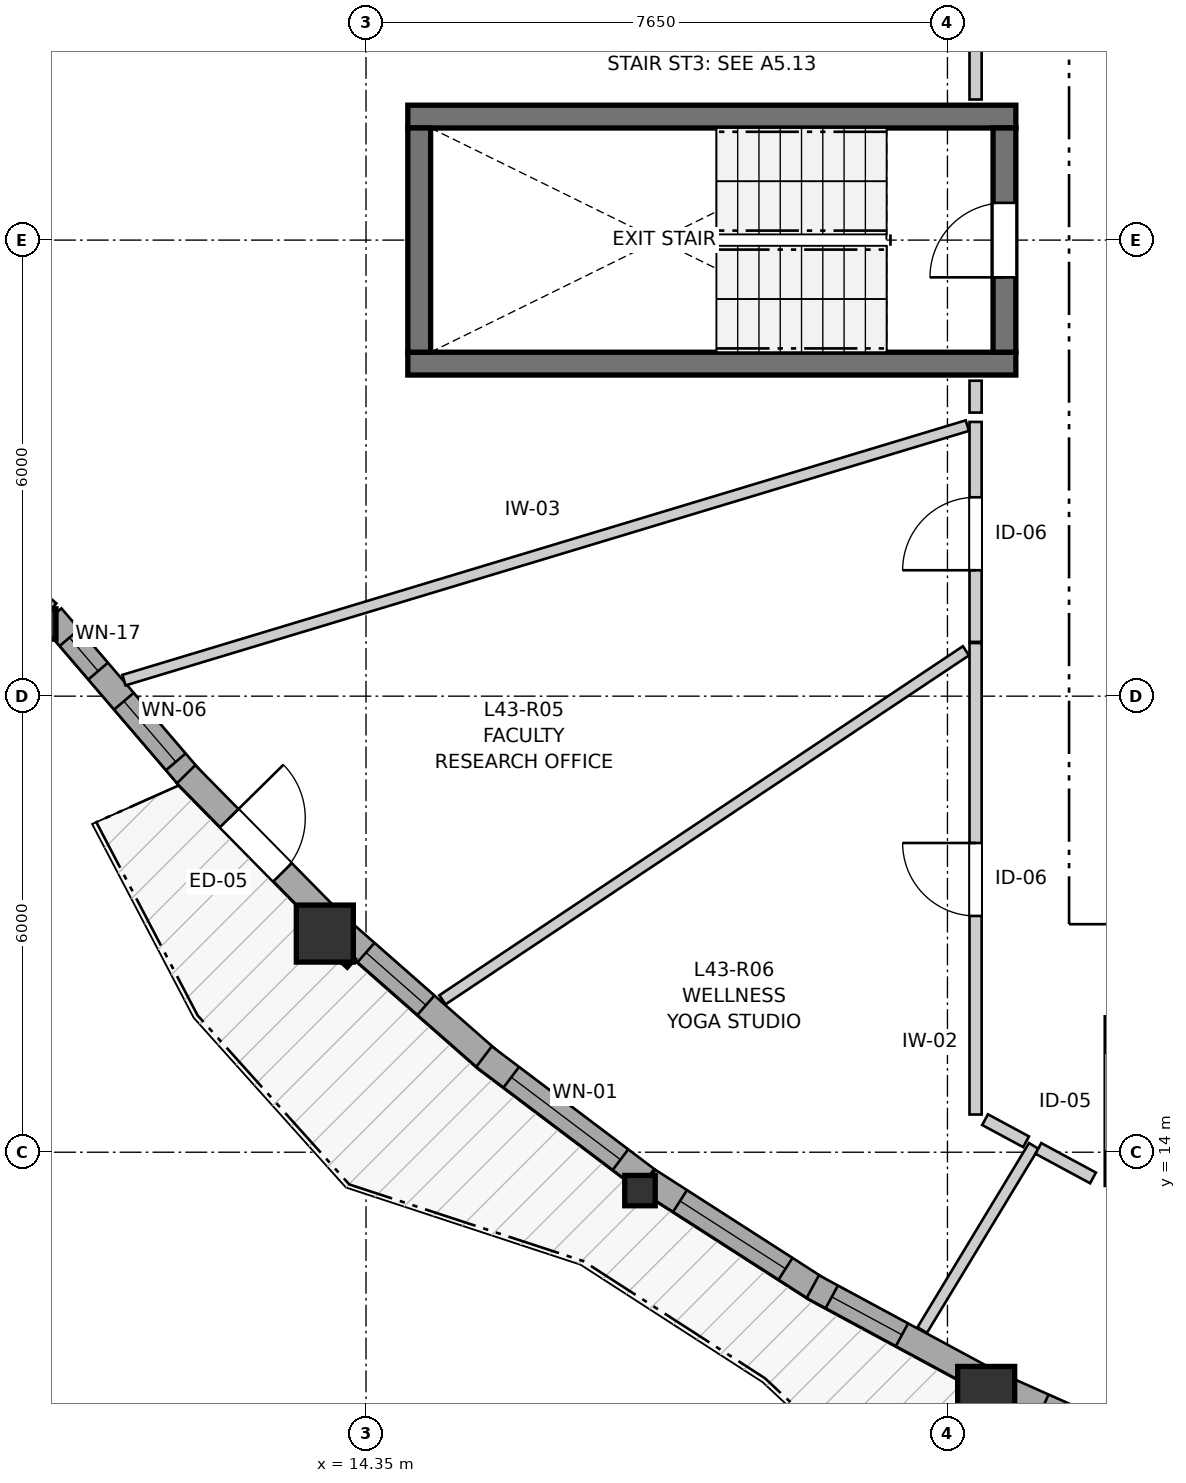
"""IFC4 building model, lengths in metres.
Left out: names, types, materials, properties, quantities, classifications, styles, units other than length and angle.
Written with IfcOpenShell. Run it as: python <this file> out.ifc"""

import sys

from ifc_helpers import new_model, si_unit, direction, frame, frame_2d, origin, origin_2d, place, context, subcontext, project, spatial, rectangle, i_section, extrude, source, transform, mapped, element, fill, save


model = new_model("IFC4")
c1 = context("Model", 3, precision=1e-05, world=origin(), true_north=direction((0.0, 1.0)))
c2 = subcontext(c1, "Body", "Model", "MODEL_VIEW")
j1 = project(units=[si_unit("LENGTHUNIT", "METRE"), si_unit("PLANEANGLEUNIT", "RADIAN")], contexts=[c1])
p1 = place(None, origin())
s1 = spatial("IfcSite", under=j1, at=p1, CompositionType="ELEMENT")
p2 = place(p1, origin())
s2 = spatial("IfcBuilding", under=s1, at=p2, CompositionType="ELEMENT")
p3 = place(p2, frame((0.0, 0.0, 145.8)))
s3 = spatial("IfcBuildingStorey", under=s2, at=p3, CompositionType="ELEMENT", Elevation=145.8)
for number, where, z_axis, x_axis in (
    (1, (14.9, 24.375, 0.0), (0.0, 0.0, 1.0), (1.0, 0.0, 0.0)),
    (2, (22.9, 27.625, 0.0), (0.0, 0.0, 1.0), (-1.0, 0.0, 0.0)),
):
    element("IfcWall", number, at=place(p3, frame(where, z_axis=z_axis, x_axis=x_axis)), inside=s3, PredefinedType="SHEAR", context=c2, shape_type="SweptSolid", body=[
        extrude(rectangle(XDim=8.0, YDim=0.3, at=frame_2d((4.0, 0.0))), origin(), (0.0, 0.0, 1.0), 2.95),
    ])
p4 = place(p3, frame((15.05, 27.475, 0.0), z_axis=(0.0, 0.0, 1.0), x_axis=(0.0, -1.0, 0.0)))
e3 = element("IfcWall", 3, at=p4, inside=s3, PredefinedType="SHEAR", context=c2, shape_type="SweptSolid", body=[
    extrude(rectangle(XDim=2.95, YDim=0.3, at=frame_2d((1.475, 0.0))), origin(), (0.0, 0.0, 1.0), 2.95),
])
p5 = place(p3, frame((22.75, 24.525, 0.0), z_axis=(0.0, 0.0, 1.0), x_axis=(0.0, 1.0, 0.0)))
e4 = element("IfcWall", 4, at=p5, inside=s3, PredefinedType="SHEAR", context=c2, shape_type="SweptSolid", body=[
    extrude(rectangle(XDim=2.95, YDim=0.3, at=frame_2d((1.475, 0.0))), origin(), (0.0, 0.0, 1.0), 2.95),
])
p6 = place(p5, frame((0.985, 0.0, 0.0)))
e5 = element("IfcOpeningElement", 5, at=p6, cuts=e4, PredefinedType="OPENING", context=c2, shape_type="SweptSolid", body=[
    extrude(rectangle(XDim=0.98, YDim=2.15, at=frame_2d((0.49, 1.075))), frame((0.0, 0.16, 0.0), z_axis=(0.0, -1.0, 0.0), x_axis=(1.0, 0.0, 0.0)), (0.0, 0.0, 1.0), 0.32),
])
m1 = source(origin(), c2, "Body", "SweptSolid", [
    extrude(i_section(OverallWidth=0.401, OverallDepth=0.399, WebThickness=0.023, FlangeThickness=0.036, FilletRadius=0.015, at=origin_2d()), origin(), (0.0, 0.0, 1.0), 2.95),
])
p7 = place(p3, frame((10.071, 20.95, 0.0), z_axis=(0.0, 0.0, 1.0), x_axis=(1.0, 0.0, 0.0)))
e6 = element("IfcColumn", 6, at=p7, inside=s3, PredefinedType="PILASTER", context=c2, shape_type="MappedRepresentation", body=[
    mapped(m1, transform((0.0, 0.0, 0.0), x_axis=(1.0, 0.0, 0.0), y_axis=(0.0, 1.0, 0.0), z_axis=(0.0, 0.0, 1.0), scale=1.0)),
])
m2 = source(origin(), c2, "Body", "SweptSolid", [
    extrude(rectangle(XDim=0.75, YDim=0.75, at=origin_2d()), origin(), (0.0, 0.0, 1.0), 2.95),
])
p8 = place(p3, frame((13.808, 16.876, 0.0), z_axis=(0.0, 0.0, 1.0), x_axis=(1.0, 0.0, 0.0)))
e7 = element("IfcColumn", 7, at=p8, inside=s3, PredefinedType="COLUMN", context=c2, shape_type="MappedRepresentation", body=[
    mapped(m2, transform((0.0, 0.0, 0.0), x_axis=(1.0, 0.0, 0.0), y_axis=(0.0, 1.0, 0.0), z_axis=(0.0, 0.0, 1.0), scale=1.0)),
])
p9 = place(p3, frame((17.954, 13.495, 0.0), z_axis=(0.0, 0.0, 1.0), x_axis=(1.0, 0.0, 0.0)))
e8 = element("IfcColumn", 8, at=p9, inside=s3, PredefinedType="PILASTER", context=c2, shape_type="MappedRepresentation", body=[
    mapped(m1, transform((0.0, 0.0, 0.0), x_axis=(1.0, 0.0, 0.0), y_axis=(0.0, 1.0, 0.0), z_axis=(0.0, 0.0, 1.0), scale=1.0)),
])
p10 = place(p3, frame((22.51, 10.807, 0.0), z_axis=(0.0, 0.0, 1.0), x_axis=(1.0, 0.0, 0.0)))
e9 = element("IfcColumn", 9, at=p10, inside=s3, PredefinedType="COLUMN", context=c2, shape_type="MappedRepresentation", body=[
    mapped(m2, transform((0.0, 0.0, 0.0), x_axis=(1.0, 0.0, 0.0), y_axis=(0.0, 1.0, 0.0), z_axis=(0.0, 0.0, 1.0), scale=1.0)),
])
p11 = place(p3, frame((8.627, 22.406, 0.0), z_axis=(0.0, 0.0, 1.0), x_axis=(0.760379886087, -0.649478582276, 0.0)))
e10 = element("IfcWall", 10, at=p11, inside=s3, PredefinedType="SOLIDWALL", context=c2, shape_type="SweptSolid", body=[
    extrude(rectangle(XDim=2.023, YDim=0.34, at=frame_2d((1.012, 0.0))), origin(), (0.0, 0.0, 1.0), 2.53),
])
p12 = place(p11, frame((0.257, 0.0, 0.82)))
e11 = element("IfcOpeningElement", 11, at=p12, cuts=e10, PredefinedType="OPENING", context=c2, shape_type="SweptSolid", body=[
    extrude(rectangle(XDim=1.45, YDim=1.25, at=frame_2d((0.725, 0.625))), frame((0.0, 0.18, 0.0), z_axis=(0.0, -1.0, 0.0), x_axis=(1.0, 0.0, 0.0)), (0.0, 0.0, 1.0), 0.36),
])
p13 = place(p3, frame((10.213, 21.045, 0.0), z_axis=(0.0, 0.0, 1.0), x_axis=(0.65036245252, -0.759624038819, 0.0)))
e12 = element("IfcWall", 12, at=p13, inside=s3, PredefinedType="SOLIDWALL", context=c2, shape_type="SweptSolid", body=[
    extrude(rectangle(XDim=2.813, YDim=0.34, at=frame_2d((1.407, 0.0))), origin(), (0.0, 0.0, 1.0), 2.53),
])
p14 = place(p13, frame((0.362, 0.0, 0.82)))
e13 = element("IfcOpeningElement", 13, at=p14, cuts=e12, PredefinedType="OPENING", context=c2, shape_type="SweptSolid", body=[
    extrude(rectangle(XDim=0.58, YDim=1.35, at=frame_2d((0.29, 0.675))), frame((0.0, 0.18, 0.0), z_axis=(0.0, -1.0, 0.0), x_axis=(1.0, 0.0, 0.0)), (0.0, 0.0, 1.0), 0.36),
])
p15 = place(p13, frame((1.463, 0.0, 0.82)))
e14 = element("IfcOpeningElement", 14, at=p15, cuts=e12, PredefinedType="OPENING", context=c2, shape_type="SweptSolid", body=[
    extrude(rectangle(XDim=1.05, YDim=1.45, at=frame_2d((0.525, 0.725))), frame((0.0, 0.18, 0.0), z_axis=(0.0, -1.0, 0.0), x_axis=(1.0, 0.0, 0.0)), (0.0, 0.0, 1.0), 0.36),
])
p16 = place(p3, frame((11.983, 18.973, 0.0), z_axis=(0.0, 0.0, 1.0), x_axis=(0.701539452628, -0.712630617084, 0.0)))
e15 = element("IfcWall", 15, at=p16, inside=s3, PredefinedType="SOLIDWALL", context=c2, shape_type="SweptSolid", body=[
    extrude(rectangle(XDim=2.619, YDim=0.34, at=frame_2d((1.31, 0.0))), origin(), (0.0, 0.0, 1.0), 2.53),
])
p17 = place(p16, frame((0.81, 0.0, 0.0)))
e16 = element("IfcOpeningElement", 16, at=p17, cuts=e15, PredefinedType="OPENING", context=c2, shape_type="SweptSolid", body=[
    extrude(rectangle(XDim=1.0, YDim=2.1, at=frame_2d((0.5, 1.05))), frame((0.0, 0.18, 0.0), z_axis=(0.0, -1.0, 0.0), x_axis=(1.0, 0.0, 0.0)), (0.0, 0.0, 1.0), 0.36),
])
p18 = place(p3, frame((14.037, 16.902, 0.0), z_axis=(0.0, 0.0, 1.0), x_axis=(0.751106484969, -0.66018107231, 0.0)))
e17 = element("IfcWall", 17, at=p18, inside=s3, PredefinedType="SOLIDWALL", context=c2, shape_type="SweptSolid", body=[
    extrude(rectangle(XDim=2.575, YDim=0.34, at=frame_2d((1.288, 0.0))), origin(), (0.0, 0.0, 1.0), 2.53),
])
p19 = place(p18, frame((0.416, 0.0, 0.82)))
e18 = element("IfcOpeningElement", 18, at=p19, cuts=e17, PredefinedType="OPENING", context=c2, shape_type="SweptSolid", body=[
    extrude(rectangle(XDim=1.05, YDim=1.45, at=frame_2d((0.525, 0.725))), frame((0.0, 0.18, 0.0), z_axis=(0.0, -1.0, 0.0), x_axis=(1.0, 0.0, 0.0)), (0.0, 0.0, 1.0), 0.36),
])
p20 = place(p3, frame((15.902, 15.258, 0.0), z_axis=(0.0, 0.0, 1.0), x_axis=(0.798071768164, -0.60256240578, 0.0)))
e19 = element("IfcWall", 19, at=p20, inside=s3, PredefinedType="SOLIDWALL", context=c2, shape_type="SweptSolid", body=[
    extrude(rectangle(XDim=2.68, YDim=0.34, at=frame_2d((1.34, 0.0))), origin(), (0.0, 0.0, 1.0), 2.53),
])
p21 = place(p20, frame((0.45, 0.0, 0.82)))
e20 = element("IfcOpeningElement", 20, at=p21, cuts=e19, PredefinedType="OPENING", context=c2, shape_type="SweptSolid", body=[
    extrude(rectangle(XDim=1.8, YDim=1.45, at=frame_2d((0.9, 0.725))), frame((0.0, 0.18, 0.0), z_axis=(0.0, -1.0, 0.0), x_axis=(1.0, 0.0, 0.0)), (0.0, 0.0, 1.0), 0.36),
])
p22 = place(p3, frame((18.063, 13.627, 0.0), z_axis=(0.0, 0.0, 1.0), x_axis=(0.841291581189, -0.540581608475, 0.0)))
e21 = element("IfcWall", 21, at=p22, inside=s3, PredefinedType="SOLIDWALL", context=c2, shape_type="SweptSolid", body=[
    extrude(rectangle(XDim=2.665, YDim=0.34, at=frame_2d((1.332, 0.0))), origin(), (0.0, 0.0, 1.0), 2.53),
])
p23 = place(p22, frame((0.497, 0.0, 0.82)))
e22 = element("IfcOpeningElement", 22, at=p23, cuts=e21, PredefinedType="OPENING", context=c2, shape_type="SweptSolid", body=[
    extrude(rectangle(XDim=1.65, YDim=1.45, at=frame_2d((0.825, 0.725))), frame((0.0, 0.18, 0.0), z_axis=(0.0, -1.0, 0.0), x_axis=(1.0, 0.0, 0.0)), (0.0, 0.0, 1.0), 0.36),
])
p24 = place(p3, frame((20.228, 12.232, 0.0), z_axis=(0.0, 0.0, 1.0), x_axis=(0.879850512407, -0.47525054005, 0.0)))
e23 = element("IfcWall", 23, at=p24, inside=s3, PredefinedType="SOLIDWALL", context=c2, shape_type="SweptSolid", body=[
    extrude(rectangle(XDim=2.53, YDim=0.34, at=frame_2d((1.265, 0.0))), origin(), (0.0, 0.0, 1.0), 2.53),
])
p25 = place(p24, frame((0.284, 0.0, 0.82)))
e24 = element("IfcOpeningElement", 24, at=p25, cuts=e23, PredefinedType="OPENING", context=c2, shape_type="SweptSolid", body=[
    extrude(rectangle(XDim=1.05, YDim=1.45, at=frame_2d((0.525, 0.725))), frame((0.0, 0.18, 0.0), z_axis=(0.0, -1.0, 0.0), x_axis=(1.0, 0.0, 0.0)), (0.0, 0.0, 1.0), 0.36),
])
p26 = place(p3, frame((22.72, 10.899, 0.0), z_axis=(0.0, 0.0, 1.0), x_axis=(0.913229052506, -0.407446558041, 0.0)))
e25 = element("IfcWall", 25, at=p26, inside=s3, PredefinedType="SOLIDWALL", context=c2, shape_type="SweptSolid", body=[
    extrude(rectangle(XDim=2.545, YDim=0.34, at=frame_2d((1.272, 0.0))), origin(), (0.0, 0.0, 1.0), 2.53),
])
p27 = place(p26, frame((0.592, 0.0, 0.82)))
e26 = element("IfcOpeningElement", 26, at=p27, cuts=e25, PredefinedType="OPENING", context=c2, shape_type="SweptSolid", body=[
    extrude(rectangle(XDim=1.35, YDim=1.45, at=frame_2d((0.675, 0.725))), frame((0.0, 0.18, 0.0), z_axis=(0.0, -1.0, 0.0), x_axis=(1.0, 0.0, 0.0)), (0.0, 0.0, 1.0), 0.36),
])
p28 = place(p3, frame((22.37, 14.496, 0.0), z_axis=(0.0, 0.0, 1.0), x_axis=(0.0, 1.0, 0.0)))
e27 = element("IfcWall", 27, at=p28, inside=s3, PredefinedType="PARTITIONING", context=c2, shape_type="SweptSolid", body=[
    extrude(rectangle(XDim=6.203, YDim=0.16, at=frame_2d((3.102, 0.0))), origin(), (0.0, 0.0, 1.0), 2.95),
])
p29 = place(p28, frame((2.613, 0.0, 0.0)))
e28 = element("IfcOpeningElement", 28, at=p29, cuts=e27, PredefinedType="OPENING", context=c2, shape_type="SweptSolid", body=[
    extrude(rectangle(XDim=0.96, YDim=2.1, at=frame_2d((0.48, 1.05))), frame((0.0, 0.09, 0.0), z_axis=(0.0, -1.0, 0.0), x_axis=(1.0, 0.0, 0.0)), (0.0, 0.0, 1.0), 0.18),
])
p30 = place(p3, frame((22.37, 27.85, 0.0), z_axis=(0.0, 0.0, 1.0), x_axis=(0.0, 1.0, 0.0)))
e29 = element("IfcWall", 29, at=p30, inside=s3, PredefinedType="PARTITIONING", context=c2, shape_type="SweptSolid", body=[
    extrude(rectangle(XDim=3.646, YDim=0.16, at=frame_2d((1.823, 0.0))), origin(), (0.0, 0.0, 1.0), 2.95),
])
p31 = place(p30, frame((1.194, 0.0, 0.0)))
e30 = element("IfcOpeningElement", 30, at=p31, cuts=e29, PredefinedType="OPENING", context=c2, shape_type="SweptSolid", body=[
    extrude(rectangle(XDim=1.3, YDim=2.1, at=frame_2d((0.65, 1.05))), frame((0.0, 0.09, 0.0), z_axis=(0.0, -1.0, 0.0), x_axis=(1.0, 0.0, 0.0)), (0.0, 0.0, 1.0), 0.18),
])
p32 = place(p3, frame((22.37, 20.714, 0.0), z_axis=(0.0, 0.0, 1.0), x_axis=(0.0, 1.0, 0.0)))
e31 = element("IfcWall", 31, at=p32, inside=s3, PredefinedType="PARTITIONING", context=c2, shape_type="SweptSolid", body=[
    extrude(rectangle(XDim=2.894, YDim=0.16, at=frame_2d((1.447, 0.0))), origin(), (0.0, 0.0, 1.0), 2.95),
])
p33 = place(p32, frame((0.942, 0.0, 0.0)))
e32 = element("IfcOpeningElement", 32, at=p33, cuts=e31, PredefinedType="OPENING", context=c2, shape_type="SweptSolid", body=[
    extrude(rectangle(XDim=0.96, YDim=2.1, at=frame_2d((0.48, 1.05))), frame((0.0, 0.09, 0.0), z_axis=(0.0, -1.0, 0.0), x_axis=(1.0, 0.0, 0.0)), (0.0, 0.0, 1.0), 0.18),
])
p34 = place(p3, frame((24.15, 15.788, 0.0), z_axis=(0.0, 0.0, 1.0), x_axis=(0.0, -1.0, 0.0)))
e33 = element("IfcWall", 33, at=p34, inside=s3, PredefinedType="PARTITIONING", context=c2, shape_type="SweptSolid", body=[
    extrude(rectangle(XDim=2.231, YDim=0.16, at=frame_2d((1.116, 0.0))), origin(), (0.0, 0.0, 1.0), 2.95),
])
p35 = place(p34, frame((0.48, 0.0, 0.0)))
e34 = element("IfcOpeningElement", 34, at=p35, cuts=e33, PredefinedType="OPENING", context=c2, shape_type="SweptSolid", body=[
    extrude(rectangle(XDim=1.3, YDim=2.1, at=frame_2d((0.65, 1.05))), frame((0.0, 0.09, 0.0), z_axis=(0.0, -1.0, 0.0), x_axis=(1.0, 0.0, 0.0)), (0.0, 0.0, 1.0), 0.18),
])
p36 = place(p3, frame((11.165, 20.211, 0.0), z_axis=(0.0, 0.0, 1.0), x_axis=(0.957361241888, 0.288893496865, 0.0)))
e35 = element("IfcWall", 35, at=p36, inside=s3, PredefinedType="PARTITIONING", context=c2, shape_type="SweptSolid", body=[
    extrude(rectangle(XDim=11.59, YDim=0.145, at=frame_2d((5.795, 0.0))), origin(), (0.0, 0.0, 1.0), 2.95),
])
p37 = place(p3, frame((15.355, 16.005, 0.0), z_axis=(0.0, 0.0, 1.0), x_axis=(0.83207298021, 0.55466616591, 0.0)))
e36 = element("IfcWall", 36, at=p37, inside=s3, PredefinedType="PARTITIONING", context=c2, shape_type="SweptSolid", body=[
    extrude(rectangle(XDim=8.278, YDim=0.145, at=frame_2d((4.139, 0.0))), origin(), (0.0, 0.0, 1.0), 2.95),
])
p38 = place(p3, frame((21.668, 11.66, 0.0), z_axis=(0.0, 0.0, 1.0), x_axis=(0.517927198926, 0.855424699557, 0.0)))
e37 = element("IfcWall", 37, at=p38, inside=s3, PredefinedType="PARTITIONING", context=c2, shape_type="SweptSolid", body=[
    extrude(rectangle(XDim=2.832, YDim=0.145, at=frame_2d((1.416, 0.0))), origin(), (0.0, 0.0, 1.0), 2.95),
])
p39 = place(p3, frame((23.196, 14.05, 0.0), z_axis=(0.0, 0.0, 1.0), x_axis=(0.880125284311, -0.474741491673, 0.0)))
e38 = element("IfcWall", 38, at=p39, inside=s3, PredefinedType="PARTITIONING", context=c2, shape_type="SweptSolid", body=[
    extrude(rectangle(XDim=0.817, YDim=0.16, at=frame_2d((0.408, 0.0))), origin(), (0.0, 0.0, 1.0), 2.95),
])
p40 = place(p3, frame((22.495, 14.428, 0.0), z_axis=(0.0, 0.0, 1.0), x_axis=(0.880048601236, -0.474883627285, 0.0)))
e39 = element("IfcWall", 39, at=p40, inside=s3, PredefinedType="PARTITIONING", context=c2, shape_type="SweptSolid", body=[
    extrude(rectangle(XDim=0.613, YDim=0.16, at=frame_2d((0.306, 0.0))), origin(), (0.0, 0.0, 1.0), 2.95),
])
p41 = place(p3, frame((22.37, 23.731, 0.0), z_axis=(0.0, 0.0, 1.0), x_axis=(0.0, 1.0, 0.0)))
e40 = element("IfcWall", 40, at=p41, inside=s3, PredefinedType="PARTITIONING", context=c2, shape_type="SweptSolid", body=[
    extrude(rectangle(XDim=0.419, YDim=0.16, at=frame_2d((0.209, 0.0))), origin(), (0.0, 0.0, 1.0), 2.95),
])
m3 = source(origin(), c2, "Body", "SweptSolid", [
    extrude(rectangle(XDim=0.58, YDim=1.35, at=frame_2d((0.29, 0.675))), frame((0.0, 0.03, 0.0), z_axis=(0.0, -1.0, 0.0), x_axis=(1.0, 0.0, 0.0)), (0.0, 0.0, 1.0), 0.06),
])
p42 = place(p14, origin())
e41 = element("IfcWindow", 41, at=p42, inside=s3, PartitioningType="SINGLE_PANEL", PredefinedType="WINDOW", context=c2, shape_type="MappedRepresentation", body=[
    mapped(m3, transform((0.0, 0.0, 0.0), x_axis=(1.0, 0.0, 0.0), y_axis=(0.0, 1.0, 0.0), z_axis=(0.0, 0.0, 1.0), scale=1.0)),
])
fill(e13, e41)
m4 = source(origin(), c2, "Body", "SweptSolid", [
    extrude(rectangle(XDim=1.05, YDim=1.45, at=frame_2d((0.525, 0.725))), frame((0.0, 0.03, 0.0), z_axis=(0.0, -1.0, 0.0), x_axis=(1.0, 0.0, 0.0)), (0.0, 0.0, 1.0), 0.06),
])
p43 = place(p15, origin())
e42 = element("IfcWindow", 42, at=p43, inside=s3, PartitioningType="SINGLE_PANEL", PredefinedType="WINDOW", context=c2, shape_type="MappedRepresentation", body=[
    mapped(m4, transform((0.0, 0.0, 0.0), x_axis=(1.0, 0.0, 0.0), y_axis=(0.0, 1.0, 0.0), z_axis=(0.0, 0.0, 1.0), scale=1.0)),
])
fill(e14, e42)
p44 = place(p19, origin())
e43 = element("IfcWindow", 43, at=p44, inside=s3, PartitioningType="SINGLE_PANEL", PredefinedType="WINDOW", context=c2, shape_type="MappedRepresentation", body=[
    mapped(m4, transform((0.0, 0.0, 0.0), x_axis=(1.0, 0.0, 0.0), y_axis=(0.0, 1.0, 0.0), z_axis=(0.0, 0.0, 1.0), scale=1.0)),
])
fill(e18, e43)
m5 = source(origin(), c2, "Body", "SweptSolid", [
    extrude(rectangle(XDim=1.8, YDim=1.45, at=frame_2d((0.9, 0.725))), frame((0.0, 0.03, 0.0), z_axis=(0.0, -1.0, 0.0), x_axis=(1.0, 0.0, 0.0)), (0.0, 0.0, 1.0), 0.06),
])
p45 = place(p21, origin())
e44 = element("IfcWindow", 44, at=p45, inside=s3, PartitioningType="SINGLE_PANEL", PredefinedType="WINDOW", context=c2, shape_type="MappedRepresentation", body=[
    mapped(m5, transform((0.0, 0.0, 0.0), x_axis=(1.0, 0.0, 0.0), y_axis=(0.0, 1.0, 0.0), z_axis=(0.0, 0.0, 1.0), scale=1.0)),
])
fill(e20, e44)
m6 = source(origin(), c2, "Body", "SweptSolid", [
    extrude(rectangle(XDim=1.65, YDim=1.45, at=frame_2d((0.825, 0.725))), frame((0.0, 0.03, 0.0), z_axis=(0.0, -1.0, 0.0), x_axis=(1.0, 0.0, 0.0)), (0.0, 0.0, 1.0), 0.06),
])
p46 = place(p23, origin())
e45 = element("IfcWindow", 45, at=p46, inside=s3, PartitioningType="SINGLE_PANEL", PredefinedType="WINDOW", context=c2, shape_type="MappedRepresentation", body=[
    mapped(m6, transform((0.0, 0.0, 0.0), x_axis=(1.0, 0.0, 0.0), y_axis=(0.0, 1.0, 0.0), z_axis=(0.0, 0.0, 1.0), scale=1.0)),
])
fill(e22, e45)
p47 = place(p25, origin())
e46 = element("IfcWindow", 46, at=p47, inside=s3, PartitioningType="SINGLE_PANEL", PredefinedType="WINDOW", context=c2, shape_type="MappedRepresentation", body=[
    mapped(m4, transform((0.0, 0.0, 0.0), x_axis=(1.0, 0.0, 0.0), y_axis=(0.0, 1.0, 0.0), z_axis=(0.0, 0.0, 1.0), scale=1.0)),
])
fill(e24, e46)
m7 = source(origin(), c2, "Body", "SweptSolid", [
    extrude(rectangle(XDim=1.0, YDim=2.1, at=frame_2d((0.5, 1.05))), frame((0.0, 0.025, 0.0), z_axis=(0.0, -1.0, 0.0), x_axis=(1.0, 0.0, 0.0)), (0.0, 0.0, 1.0), 0.05),
])
p48 = place(p17, origin())
e47 = element("IfcDoor", 47, at=p48, inside=s3, OperationType="SINGLE_SWING_LEFT", PredefinedType="DOOR", context=c2, shape_type="MappedRepresentation", body=[
    mapped(m7, transform((0.0, 0.0, 0.0), x_axis=(1.0, 0.0, 0.0), y_axis=(0.0, 1.0, 0.0), z_axis=(0.0, 0.0, 1.0), scale=1.0)),
])
fill(e16, e47)
m8 = source(origin(), c2, "Body", "SweptSolid", [
    extrude(rectangle(XDim=0.98, YDim=2.15, at=frame_2d((0.49, 1.075))), frame((0.0, 0.025, 0.0), z_axis=(0.0, -1.0, 0.0), x_axis=(1.0, 0.0, 0.0)), (0.0, 0.0, 1.0), 0.05),
])
p49 = place(p6, origin())
e48 = element("IfcDoor", 48, at=p49, inside=s3, OperationType="SINGLE_SWING_LEFT", PredefinedType="DOOR", context=c2, shape_type="MappedRepresentation", body=[
    mapped(m8, transform((0.0, 0.0, 0.0), x_axis=(1.0, 0.0, 0.0), y_axis=(0.0, 1.0, 0.0), z_axis=(0.0, 0.0, 1.0), scale=1.0)),
])
fill(e5, e48)
m9 = source(origin(), c2, "Body", "SweptSolid", [
    extrude(rectangle(XDim=0.96, YDim=2.1, at=frame_2d((0.48, 1.05))), frame((0.0, 0.025, 0.0), z_axis=(0.0, -1.0, 0.0), x_axis=(1.0, 0.0, 0.0)), (0.0, 0.0, 1.0), 0.05),
])
p50 = place(p29, origin())
e49 = element("IfcDoor", 49, at=p50, inside=s3, OperationType="SINGLE_SWING_RIGHT", PredefinedType="DOOR", context=c2, shape_type="MappedRepresentation", body=[
    mapped(m9, transform((0.0, 0.0, 0.0), x_axis=(1.0, 0.0, 0.0), y_axis=(0.0, 1.0, 0.0), z_axis=(0.0, 0.0, 1.0), scale=1.0)),
])
fill(e28, e49)
p51 = place(p33, origin())
e50 = element("IfcDoor", 50, at=p51, inside=s3, OperationType="SINGLE_SWING_LEFT", PredefinedType="DOOR", context=c2, shape_type="MappedRepresentation", body=[
    mapped(m9, transform((0.0, 0.0, 0.0), x_axis=(1.0, 0.0, 0.0), y_axis=(0.0, 1.0, 0.0), z_axis=(0.0, 0.0, 1.0), scale=1.0)),
])
fill(e32, e50)
save(model, sys.argv[1])
